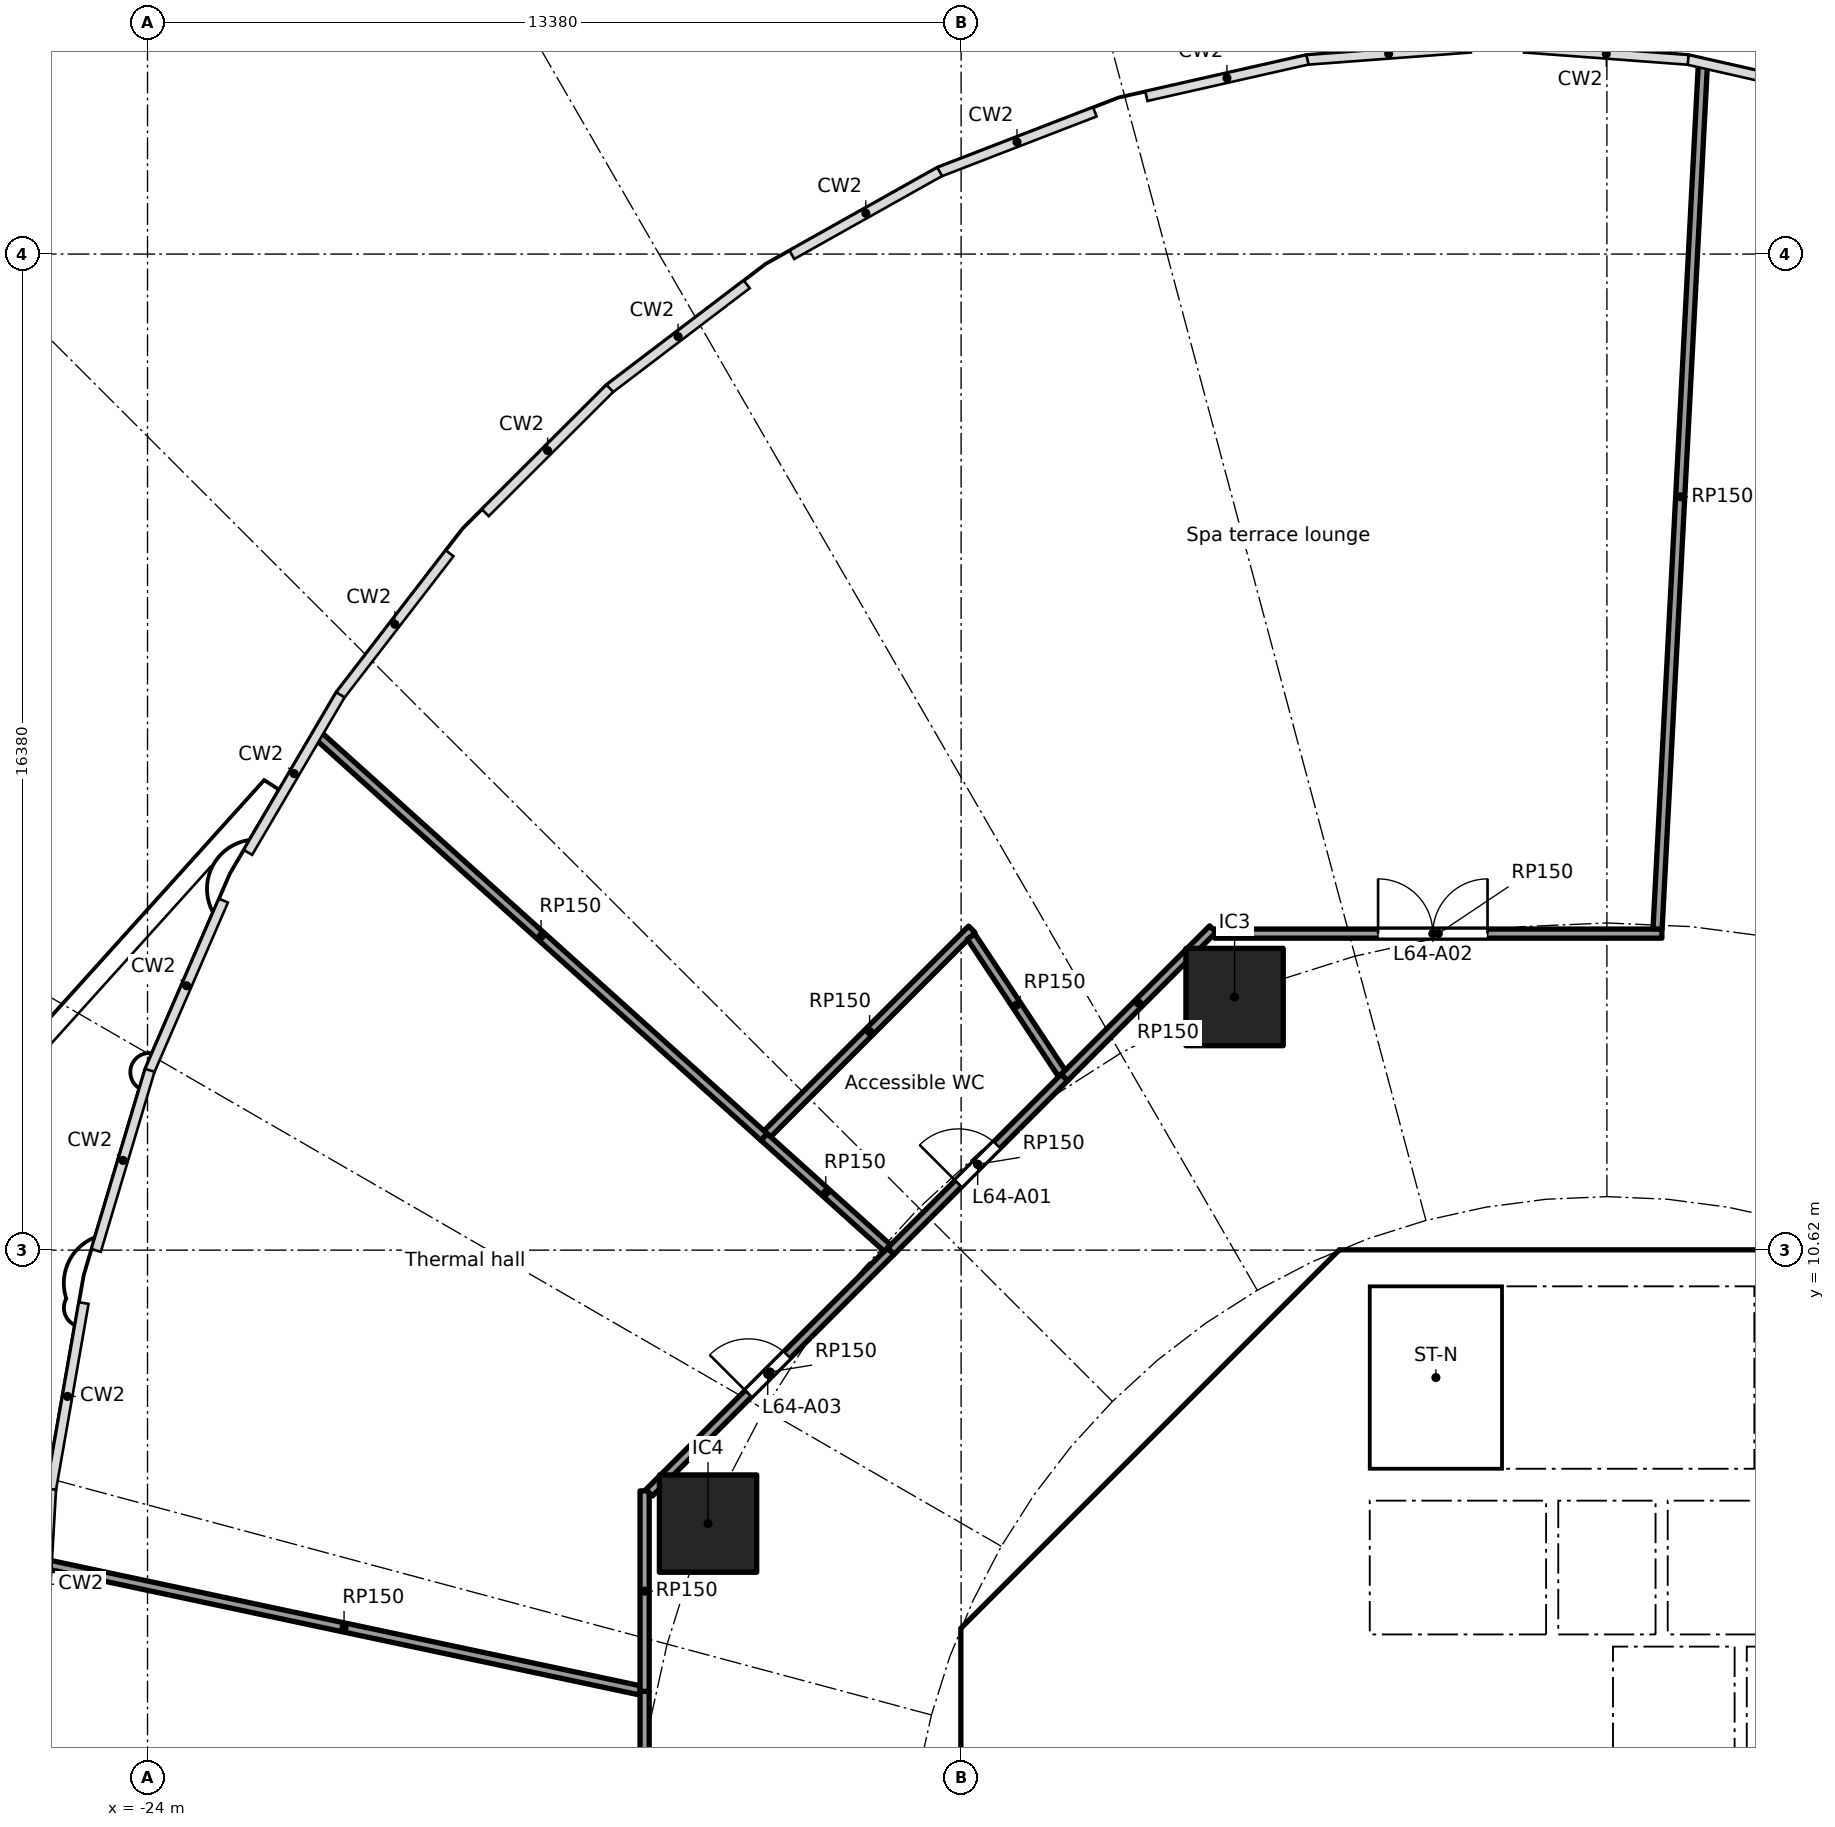
"""IFC4 building model, lengths in metres.
Left out: names, types, materials, properties, quantities, classifications, styles, units other than length and angle.
Written with IfcOpenShell. Run it as: python <this file> out.ifc"""

import sys

from ifc_helpers import new_model, si_unit, direction, frame, frame_2d, origin, origin_2d, place, context, subcontext, project, spatial, polyline, rectangle, outline, extrude, element, fill, save


model = new_model("IFC4")
c1 = context("Model", 3, precision=1e-05, world=origin(), true_north=direction((0.0, 1.0)))
c2 = subcontext(c1, "Body", "Model", "MODEL_VIEW")
j1 = project(units=[si_unit("LENGTHUNIT", "METRE"), si_unit("PLANEANGLEUNIT", "RADIAN")], contexts=[c1])
p1 = place(None, origin())
s1 = spatial("IfcSite", under=j1, at=p1, CompositionType="ELEMENT")
p2 = place(p1, origin())
s2 = spatial("IfcBuilding", under=s1, at=p2, CompositionType="ELEMENT")
p3 = place(p2, frame((0.0, 0.0, 252.9)))
s3 = spatial("IfcBuildingStorey", under=s2, at=p3, CompositionType="ELEMENT", Elevation=252.9)
for number, where, z_axis, x_axis in (
    (1, (-6.123, 14.782, 0.0), (0.0, 0.0, 1.0), (1.0, 0.0, 0.0)),
    (2, (-14.782, 6.123, 0.0), (0.0, 0.0, 1.0), (1.0, 0.0, 0.0)),
):
    element("IfcColumn", number, at=place(p3, frame(where, z_axis=z_axis, x_axis=x_axis)), inside=s3, PredefinedType="COLUMN", context=c2, shape_type="SweptSolid", body=[
        extrude(rectangle(XDim=1.6, YDim=1.6, at=origin_2d()), origin(), (0.0, 0.0, 1.0), 5.6),
    ])
p4 = place(p3, frame((-4.613, 9.988, 0.0), z_axis=(0.0, 0.0, 1.0), x_axis=(-0.707106781187, -0.707106781187, 0.0)))
e3 = element("IfcWall", 3, at=p4, inside=s3, PredefinedType="SHEAR", context=c2, shape_type="SweptSolid", body=[
    extrude(rectangle(XDim=7.602, YDim=0.6, at=frame_2d((3.801, 0.0))), origin(), (0.0, 0.0, 1.0), 5.34),
])
p5 = place(p4, frame((0.351, 0.0, 0.0)))
e4 = element("IfcOpeningElement", 4, at=p5, cuts=e3, PredefinedType="OPENING", context=c2, shape_type="SweptSolid", body=[
    extrude(rectangle(XDim=1.1, YDim=2.1, at=frame_2d((0.55, 1.05))), frame((0.0, 0.31, 0.0), z_axis=(0.0, -1.0, 0.0), x_axis=(1.0, 0.0, 0.0)), (0.0, 0.0, 1.0), 0.62),
])
p6 = place(p3, frame((-10.325, 3.801, 0.0), z_axis=(0.0, 0.0, 1.0), x_axis=(0.0, -1.0, 0.0)))
e5 = element("IfcWall", 5, at=p6, inside=s3, PredefinedType="SHEAR", context=c2, shape_type="SweptSolid", body=[
    extrude(rectangle(XDim=7.602, YDim=0.6, at=frame_2d((3.801, 0.0))), origin(), (0.0, 0.0, 1.0), 5.34),
])
p7 = place(p6, frame((0.651, 0.0, 0.0)))
e6 = element("IfcOpeningElement", 6, at=p7, cuts=e5, PredefinedType="OPENING", context=c2, shape_type="SweptSolid", body=[
    extrude(rectangle(XDim=1.5, YDim=2.1, at=frame_2d((0.75, 1.05))), frame((0.0, 0.31, 0.0), z_axis=(0.0, -1.0, 0.0), x_axis=(1.0, 0.0, 0.0)), (0.0, 0.0, 1.0), 0.62),
])
p8 = place(p6, frame((5.451, 0.0, 0.0)))
e7 = element("IfcOpeningElement", 7, at=p8, cuts=e5, PredefinedType="OPENING", context=c2, shape_type="SweptSolid", body=[
    extrude(rectangle(XDim=1.5, YDim=2.1, at=frame_2d((0.75, 1.05))), frame((0.0, 0.31, 0.0), z_axis=(0.0, -1.0, 0.0), x_axis=(1.0, 0.0, 0.0)), (0.0, 0.0, 1.0), 0.62),
])
p9 = place(p3, frame((-5.8, 4.3, 0.0), z_axis=(0.0, 0.0, 1.0), x_axis=(0.0, 1.0, 0.0)))
e8 = element("IfcWall", 8, at=p9, inside=s3, PredefinedType="PARTITIONING", context=c2, shape_type="SweptSolid", body=[
    extrude(rectangle(XDim=3.927, YDim=0.15, at=frame_2d((1.963, 0.0))), origin(), (0.0, 0.0, 1.0), 5.34),
])
p10 = place(p9, frame((1.551, 0.0, 0.0)))
e9 = element("IfcOpeningElement", 9, at=p10, cuts=e8, PredefinedType="OPENING", context=c2, shape_type="SweptSolid", body=[
    extrude(rectangle(XDim=0.9, YDim=2.1, at=frame_2d((0.45, 1.05))), frame((0.0, 0.085, 0.0), z_axis=(0.0, -1.0, 0.0), x_axis=(1.0, 0.0, 0.0)), (0.0, 0.0, 1.0), 0.17),
])
p11 = place(p3, frame((-4.0, 4.3, 0.0), z_axis=(0.0, 0.0, 1.0), x_axis=(0.0, 1.0, 0.0)))
e10 = element("IfcWall", 10, at=p11, inside=s3, PredefinedType="SOLIDWALL", context=c2, shape_type="SweptSolid", body=[
    extrude(rectangle(XDim=2.2, YDim=0.2, at=frame_2d((1.1, 0.0))), origin(), (0.0, 0.0, 1.0), 5.34),
])
p12 = place(p11, frame((0.55, 0.0, 0.0)))
e11 = element("IfcOpeningElement", 11, at=p12, cuts=e10, PredefinedType="OPENING", context=c2, shape_type="SweptSolid", body=[
    extrude(rectangle(XDim=1.1, YDim=2.1, at=frame_2d((0.55, 1.05))), frame((0.0, 0.11, 0.0), z_axis=(0.0, -1.0, 0.0), x_axis=(1.0, 0.0, 0.0)), (0.0, 0.0, 1.0), 0.22),
])
p13 = place(p3, origin())
e12 = element("IfcWall", 12, at=p13, inside=s3, PredefinedType="SHEAR", context=c2, shape_type="SweptSolid", body=[
    extrude(outline(polyline([(-10.2, 4.825), (-9.776, 4.401), (-10.025, 4.152), (-10.025, 3.801), (-10.625, 3.801), (-10.625, 4.401), (-10.2, 4.825)])), origin(), (0.0, 0.0, 1.0), 5.34),
])
p14 = place(p3, origin())
e13 = element("IfcWall", 13, at=p14, inside=s3, PredefinedType="SHEAR", context=c2, shape_type="SweptSolid", body=[
    extrude(outline(polyline([(-4.152, 10.025), (-4.401, 9.776), (-4.825, 10.2), (-4.401, 10.625), (4.401, 10.625), (4.825, 10.2), (4.401, 9.776), (4.152, 10.025), (-4.152, 10.025)])), origin(), (0.0, 0.0, 1.0), 5.34),
])
for number, where, z_axis, x_axis in (
    (14, (-0.9, 4.3, 0.0), (0.0, 0.0, 1.0), (0.0, 1.0, 0.0)),
    (15, (0.9, 4.3, 0.0), (0.0, 0.0, 1.0), (0.0, 1.0, 0.0)),
):
    element("IfcWall", number, at=place(p3, frame(where, z_axis=z_axis, x_axis=x_axis)), inside=s3, PredefinedType="SOLIDWALL", context=c2, shape_type="SweptSolid", body=[
        extrude(rectangle(XDim=2.2, YDim=0.2, at=frame_2d((1.1, 0.0))), origin(), (0.0, 0.0, 1.0), 5.34),
    ])
p15 = place(p3, origin())
e16 = element("IfcWall", 16, at=p15, inside=s3, PredefinedType="SOLIDWALL", context=c2, shape_type="SweptSolid", body=[
    extrude(outline(polyline([(-6.7, 4.3), (6.7, 4.3), (6.7, 2.1), (6.5, 2.1), (6.5, 4.1), (4.5, 4.1), (4.5, 2.1), (4.3, 2.1), (4.3, 4.1), (2.3, 4.1), (2.3, 2.1), (2.1, 2.1), (2.1, 4.1), (0.1, 4.1), (0.1, 2.1), (-0.1, 2.1), (-0.1, 4.1), (-6.5, 4.1), (-6.5, 2.1), (-6.7, 2.1), (-6.7, 4.3)])), origin(), (0.0, 0.0, 1.0), 5.34),
])
p16 = place(p3, frame((-10.025, 4.0, 0.0), z_axis=(0.0, 0.0, 1.0), x_axis=(1.0, 0.0, 0.0)))
e17 = element("IfcWall", 17, at=p16, inside=s3, PredefinedType="PARTITIONING", context=c2, shape_type="SweptSolid", body=[
    extrude(rectangle(XDim=3.325, YDim=0.2, at=frame_2d((1.662, 0.0))), origin(), (0.0, 0.0, 1.0), 5.34),
])
p17 = place(p3, origin())
e18 = element("IfcWall", 18, at=p17, inside=s3, PredefinedType="SOLIDWALL", context=c2, shape_type="SweptSolid", body=[
    extrude(outline(polyline([(-3.9, 7.025), (-4.1, 7.025), (-4.1, 10.025), (-3.9, 10.025), (-3.9, 7.025)])), origin(), (0.0, 0.0, 1.0), 5.34),
])
p18 = place(p3, origin())
e19 = element("IfcWall", 19, at=p18, inside=s3, PredefinedType="SOLIDWALL", context=c2, shape_type="SweptSolid", body=[
    extrude(outline(polyline([(4.1, 6.5), (-4.1, 6.5), (-4.1, 7.025), (4.1, 7.025), (4.1, 6.5)])), origin(), (0.0, 0.0, 1.0), 5.34),
])
p19 = place(p3, frame((-15.825, -6.661, 0.0), z_axis=(0.0, 0.0, 1.0), x_axis=(0.0, 1.0, 0.0)))
e20 = element("IfcWall", 20, at=p19, inside=s3, PredefinedType="PARTITIONING", context=c2, shape_type="SweptSolid", body=[
    extrude(rectangle(XDim=10.025, YDim=0.15, at=frame_2d((5.013, 0.0))), origin(), (0.0, 0.0, 1.0), 5.34),
])
p20 = place(p19, frame((4.615, 0.0, 0.0)))
e21 = element("IfcOpeningElement", 21, at=p20, cuts=e20, PredefinedType="OPENING", context=c2, shape_type="SweptSolid", body=[
    extrude(rectangle(XDim=0.9, YDim=2.1, at=frame_2d((0.45, 1.05))), frame((0.0, 0.085, 0.0), z_axis=(0.0, -1.0, 0.0), x_axis=(1.0, 0.0, 0.0)), (0.0, 0.0, 1.0), 0.17),
])
p21 = place(p3, frame((-15.9, 3.38, 0.0), z_axis=(0.0, 0.0, 1.0), x_axis=(-0.978148189415, 0.20790892127, 0.0)))
e22 = element("IfcWall", 22, at=p21, inside=s3, PredefinedType="PARTITIONING", context=c2, shape_type="SweptSolid", body=[
    extrude(rectangle(XDim=9.953, YDim=0.15, at=frame_2d((4.977, 0.0))), origin(), (0.0, 0.0, 1.0), 5.34),
])
p22 = place(p3, frame((-15.825, 3.364, 0.0), z_axis=(0.0, 0.0, 1.0), x_axis=(0.0, 1.0, 0.0)))
e23 = element("IfcWall", 23, at=p22, inside=s3, PredefinedType="PARTITIONING", context=c2, shape_type="SweptSolid", body=[
    extrude(rectangle(XDim=3.297, YDim=0.15, at=frame_2d((1.648, 0.0))), origin(), (0.0, 0.0, 1.0), 5.34),
])
p23 = place(p3, frame((-15.75, 6.63, 0.0), z_axis=(0.0, 0.0, 1.0), x_axis=(0.707193665351, 0.707019886345, 0.0)))
e24 = element("IfcWall", 24, at=p23, inside=s3, PredefinedType="PARTITIONING", context=c2, shape_type="SweptSolid", body=[
    extrude(rectangle(XDim=5.62, YDim=0.15, at=frame_2d((2.81, 0.0))), origin(), (0.0, 0.0, 1.0), 5.34),
])
p24 = place(p23, frame((2.307, 0.0, 0.0)))
e25 = element("IfcOpeningElement", 25, at=p24, cuts=e24, PredefinedType="OPENING", context=c2, shape_type="SweptSolid", body=[
    extrude(rectangle(XDim=0.9, YDim=2.1, at=frame_2d((0.45, 1.05))), frame((0.0, 0.085, 0.0), z_axis=(0.0, -1.0, 0.0), x_axis=(1.0, 0.0, 0.0)), (0.0, 0.0, 1.0), 0.17),
])
p25 = place(p3, frame((-13.86, 12.479, 0.0), z_axis=(0.0, 0.0, 1.0), x_axis=(-0.743139166891, 0.669136890803, 0.0)))
e26 = element("IfcWall", 26, at=p25, inside=s3, PredefinedType="PARTITIONING", context=c2, shape_type="SweptSolid", body=[
    extrude(rectangle(XDim=9.871, YDim=0.15, at=frame_2d((4.936, 0.0))), origin(), (0.0, 0.0, 1.0), 5.34),
])
p26 = place(p3, frame((-13.807, 12.532, 0.0), z_axis=(0.0, 0.0, 1.0), x_axis=(0.70713244796, 0.707081113481, 0.0)))
e27 = element("IfcWall", 27, at=p26, inside=s3, PredefinedType="PARTITIONING", context=c2, shape_type="SweptSolid", body=[
    extrude(rectangle(XDim=4.756, YDim=0.15, at=frame_2d((2.378, 0.0))), origin(), (0.0, 0.0, 1.0), 5.34),
])
p27 = place(p3, frame((-11.832, 10.653, 0.0), z_axis=(0.0, 0.0, 1.0), x_axis=(-0.743258557706, 0.669004272331, 0.0)))
e28 = element("IfcWall", 28, at=p27, inside=s3, PredefinedType="PARTITIONING", context=c2, shape_type="SweptSolid", body=[
    extrude(rectangle(XDim=2.729, YDim=0.15, at=frame_2d((1.365, 0.0))), origin(), (0.0, 0.0, 1.0), 5.34),
])
p28 = place(p3, frame((-11.776, 10.603, 0.0), z_axis=(0.0, 0.0, 1.0), x_axis=(0.706985897903, 0.707227643808, 0.0)))
e29 = element("IfcWall", 29, at=p28, inside=s3, PredefinedType="PARTITIONING", context=c2, shape_type="SweptSolid", body=[
    extrude(rectangle(XDim=4.04, YDim=0.15, at=frame_2d((2.02, 0.0))), origin(), (0.0, 0.0, 1.0), 5.34),
])
p29 = place(p28, frame((1.57, 0.0, 0.0)))
e30 = element("IfcOpeningElement", 30, at=p29, cuts=e29, PredefinedType="OPENING", context=c2, shape_type="SweptSolid", body=[
    extrude(rectangle(XDim=0.9, YDim=2.1, at=frame_2d((0.45, 1.05))), frame((0.0, 0.085, 0.0), z_axis=(0.0, -1.0, 0.0), x_axis=(1.0, 0.0, 0.0)), (0.0, 0.0, 1.0), 0.17),
])
p30 = place(p3, frame((-10.456, 15.777, 0.0), z_axis=(0.0, 0.0, 1.0), x_axis=(0.552489229136, -0.833520036765, 0.0)))
e31 = element("IfcWall", 31, at=p30, inside=s3, PredefinedType="PARTITIONING", context=c2, shape_type="SweptSolid", body=[
    extrude(rectangle(XDim=2.704, YDim=0.15, at=frame_2d((1.352, 0.0))), origin(), (0.0, 0.0, 1.0), 5.34),
])
p31 = place(p3, frame((-8.92, 13.46, 0.0), z_axis=(0.0, 0.0, 1.0), x_axis=(0.707106781187, 0.707106781187, 0.0)))
e32 = element("IfcWall", 32, at=p31, inside=s3, PredefinedType="PARTITIONING", context=c2, shape_type="SweptSolid", body=[
    extrude(rectangle(XDim=3.451, YDim=0.15, at=frame_2d((1.725, 0.0))), origin(), (0.0, 0.0, 1.0), 5.34),
])
p32 = place(p3, frame((-6.449, 15.825, 0.0), z_axis=(0.0, 0.0, 1.0), x_axis=(1.0, 0.0, 0.0)))
e33 = element("IfcWall", 33, at=p32, inside=s3, PredefinedType="PARTITIONING", context=c2, shape_type="SweptSolid", body=[
    extrude(rectangle(XDim=7.353, YDim=0.15, at=frame_2d((3.677, 0.0))), origin(), (0.0, 0.0, 1.0), 5.34),
])
p33 = place(p32, frame((2.686, 0.0, 0.0)))
e34 = element("IfcOpeningElement", 34, at=p33, cuts=e33, PredefinedType="OPENING", context=c2, shape_type="SweptSolid", body=[
    extrude(rectangle(XDim=1.8, YDim=2.1, at=frame_2d((0.9, 1.05))), frame((0.0, 0.085, 0.0), z_axis=(0.0, -1.0, 0.0), x_axis=(1.0, 0.0, 0.0)), (0.0, 0.0, 1.0), 0.17),
])
p34 = place(p3, frame((0.833, 15.9, 0.0), z_axis=(0.0, 0.0, 1.0), x_axis=(0.052336520132, 0.998629505202, 0.0)))
e35 = element("IfcWall", 35, at=p34, inside=s3, PredefinedType="PARTITIONING", context=c2, shape_type="SweptSolid", body=[
    extrude(rectangle(XDim=14.237, YDim=0.15, at=frame_2d((7.119, 0.0))), origin(), (0.0, 0.0, 1.0), 5.34),
])
p35 = place(p12, origin())
e36 = element("IfcDoor", 36, at=p35, inside=s3, OperationType="DOUBLE_DOOR_SLIDING", PredefinedType="DOOR", context=c2, shape_type="SweptSolid", body=[
    extrude(rectangle(XDim=1.1, YDim=2.1, at=frame_2d((0.55, 1.05))), frame((0.0, 0.025, 0.0), z_axis=(0.0, -1.0, 0.0), x_axis=(1.0, 0.0, 0.0)), (0.0, 0.0, 1.0), 0.05),
])
fill(e11, e36)
p36 = place(p10, origin())
e37 = element("IfcDoor", 37, at=p36, inside=s3, OperationType="SINGLE_SWING_RIGHT", PredefinedType="DOOR", context=c2, shape_type="SweptSolid", body=[
    extrude(rectangle(XDim=0.9, YDim=2.1, at=frame_2d((0.45, 1.05))), frame((0.0, 0.025, 0.0), z_axis=(0.0, -1.0, 0.0), x_axis=(1.0, 0.0, 0.0)), (0.0, 0.0, 1.0), 0.05),
])
fill(e9, e37)
p37 = place(p7, origin())
e38 = element("IfcDoor", 38, at=p37, inside=s3, OperationType="DOUBLE_DOOR_SINGLE_SWING", PredefinedType="DOOR", context=c2, shape_type="SweptSolid", body=[
    extrude(rectangle(XDim=1.5, YDim=2.1, at=frame_2d((0.75, 1.05))), frame((0.0, 0.025, 0.0), z_axis=(0.0, -1.0, 0.0), x_axis=(1.0, 0.0, 0.0)), (0.0, 0.0, 1.0), 0.05),
])
fill(e6, e38)
p38 = place(p5, origin())
e39 = element("IfcDoor", 39, at=p38, inside=s3, OperationType="SINGLE_SWING_LEFT", PredefinedType="DOOR", context=c2, shape_type="SweptSolid", body=[
    extrude(rectangle(XDim=1.1, YDim=2.1, at=frame_2d((0.55, 1.05))), frame((0.0, 0.025, 0.0), z_axis=(0.0, -1.0, 0.0), x_axis=(1.0, 0.0, 0.0)), (0.0, 0.0, 1.0), 0.05),
])
fill(e4, e39)
p39 = place(p29, origin())
e40 = element("IfcDoor", 40, at=p39, inside=s3, OperationType="SINGLE_SWING_LEFT", PredefinedType="DOOR", context=c2, shape_type="SweptSolid", body=[
    extrude(rectangle(XDim=0.9, YDim=2.1, at=frame_2d((0.45, 1.05))), frame((0.0, 0.025, 0.0), z_axis=(0.0, -1.0, 0.0), x_axis=(1.0, 0.0, 0.0)), (0.0, 0.0, 1.0), 0.05),
])
fill(e30, e40)
p40 = place(p33, origin())
e41 = element("IfcDoor", 41, at=p40, inside=s3, OperationType="DOUBLE_DOOR_SINGLE_SWING", PredefinedType="DOOR", context=c2, shape_type="SweptSolid", body=[
    extrude(rectangle(XDim=1.8, YDim=2.1, at=frame_2d((0.9, 1.05))), frame((0.0, 0.025, 0.0), z_axis=(0.0, -1.0, 0.0), x_axis=(1.0, 0.0, 0.0)), (0.0, 0.0, 1.0), 0.05),
])
fill(e34, e41)
p41 = place(p24, origin())
e42 = element("IfcDoor", 42, at=p41, inside=s3, OperationType="SINGLE_SWING_LEFT", PredefinedType="DOOR", context=c2, shape_type="SweptSolid", body=[
    extrude(rectangle(XDim=0.9, YDim=2.1, at=frame_2d((0.45, 1.05))), frame((0.0, 0.025, 0.0), z_axis=(0.0, -1.0, 0.0), x_axis=(1.0, 0.0, 0.0)), (0.0, 0.0, 1.0), 0.05),
])
fill(e25, e42)
save(model, sys.argv[1])
